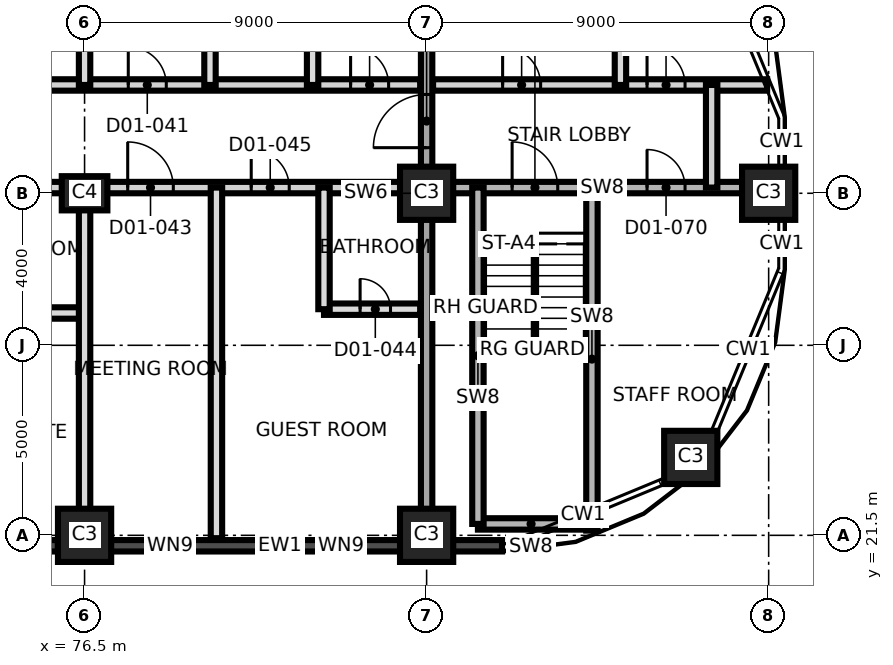
"""IFC4 building model, lengths in metres.
Left out: names, types, materials, properties, quantities, classifications, styles, units other than length and angle.
Written with IfcOpenShell. Run it as: python <this file> out.ifc"""

import sys

from ifc_helpers import new_model, si_unit, direction, frame, frame_2d, origin, origin_2d, place, context, subcontext, project, spatial, rectangle, extrude, element, fill, save


model = new_model("IFC4")
c1 = context("Model", 3, precision=1e-05, world=origin(), true_north=direction((0.0, 1.0)))
c2 = subcontext(c1, "Body", "Model", "MODEL_VIEW")
j1 = project(units=[si_unit("LENGTHUNIT", "METRE"), si_unit("PLANEANGLEUNIT", "RADIAN")], contexts=[c1])
p1 = place(None, origin())
s1 = spatial("IfcSite", under=j1, at=p1, CompositionType="ELEMENT")
p2 = place(p1, origin())
s2 = spatial("IfcBuilding", under=s1, at=p2, CompositionType="ELEMENT")
p3 = place(p2, frame((0.0, 0.0, 33.5)))
s3 = spatial("IfcBuildingStorey", under=s2, at=p3, CompositionType="ELEMENT", Elevation=33.5)
for number, where, z_axis, x_axis in (
    (1, (76.5, 21.5, 0.0), (0.0, 0.0, 1.0), (1.0, 0.0, 0.0)),
    (2, (85.5, 21.5, 0.0), (0.0, 0.0, 1.0), (1.0, 0.0, 0.0)),
    (3, (92.45, 23.55, 0.0), (0.0, 0.0, 1.0), (1.0, 0.0, 0.0)),
):
    element("IfcColumn", number, at=place(p3, frame(where, z_axis=z_axis, x_axis=x_axis)), inside=s3, PredefinedType="COLUMN", context=c2, shape_type="SweptSolid", body=[
        extrude(rectangle(XDim=1.4, YDim=1.4, at=origin_2d()), origin(), (0.0, 0.0, 1.0), 3.7),
    ])
p4 = place(p3, frame((76.5, 30.5, 0.0), z_axis=(0.0, 0.0, 1.0), x_axis=(1.0, 0.0, 0.0)))
e4 = element("IfcColumn", 4, at=p4, inside=s3, PredefinedType="COLUMN", context=c2, shape_type="SweptSolid", body=[
    extrude(rectangle(XDim=1.2, YDim=0.9, at=origin_2d()), origin(), (0.0, 0.0, 1.0), 3.7),
])
for number, where, z_axis, x_axis in (
    (5, (85.5, 30.5, 0.0), (0.0, 0.0, 1.0), (1.0, 0.0, 0.0)),
    (6, (94.5, 30.5, 0.0), (0.0, 0.0, 1.0), (1.0, 0.0, 0.0)),
):
    element("IfcColumn", number, at=place(p3, frame(where, z_axis=z_axis, x_axis=x_axis)), inside=s3, PredefinedType="COLUMN", context=c2, shape_type="SweptSolid", body=[
        extrude(rectangle(XDim=1.4, YDim=1.4, at=origin_2d()), origin(), (0.0, 0.0, 1.0), 3.7),
    ])
p5 = place(p3, frame((85.5, 21.425, 0.0), z_axis=(0.0, 0.0, 1.0), x_axis=(0.0, 1.0, 0.0)))
e7 = element("IfcWall", 7, at=p5, inside=s3, PredefinedType="SHEAR", context=c2, shape_type="SweptSolid", body=[
    extrude(rectangle(XDim=18.15, YDim=0.3, at=frame_2d((9.075, 0.0))), origin(), (0.0, 0.0, 1.0), 3.7),
])
p6 = place(p5, frame((10.275, 0.0, 0.0)))
e8 = element("IfcOpeningElement", 8, at=p6, cuts=e7, PredefinedType="OPENING", context=c2, shape_type="SweptSolid", body=[
    extrude(rectangle(XDim=1.4, YDim=2.1, at=frame_2d((0.7, 1.05))), frame((0.0, 0.16, 0.0), z_axis=(0.0, -1.0, 0.0), x_axis=(1.0, 0.0, 0.0)), (0.0, 0.0, 1.0), 0.32),
])
p7 = place(p3, frame((68.2, 21.225, 0.0), z_axis=(0.0, 0.0, 1.0), x_axis=(1.0, 0.0, 0.0)))
e9 = element("IfcWall", 9, at=p7, inside=s3, PredefinedType="SOLIDWALL", context=c2, shape_type="SweptSolid", body=[
    extrude(rectangle(XDim=7.6, YDim=0.3, at=frame_2d((3.8, 0.0))), origin(), (0.0, 0.0, 1.0), 2.7),
])
p8 = place(p7, frame((0.95, 0.0, 0.9)))
e10 = element("IfcOpeningElement", 10, at=p8, cuts=e9, PredefinedType="OPENING", context=c2, shape_type="SweptSolid", body=[
    extrude(rectangle(XDim=1.2, YDim=1.5, at=frame_2d((0.6, 0.75))), frame((0.0, 0.16, 0.0), z_axis=(0.0, -1.0, 0.0), x_axis=(1.0, 0.0, 0.0)), (0.0, 0.0, 1.0), 0.32),
])
p9 = place(p7, frame((5.45, 0.0, 0.9)))
e11 = element("IfcOpeningElement", 11, at=p9, cuts=e9, PredefinedType="OPENING", context=c2, shape_type="SweptSolid", body=[
    extrude(rectangle(XDim=1.2, YDim=1.5, at=frame_2d((0.6, 0.75))), frame((0.0, 0.16, 0.0), z_axis=(0.0, -1.0, 0.0), x_axis=(1.0, 0.0, 0.0)), (0.0, 0.0, 1.0), 0.32),
])
p10 = place(p3, frame((75.8, 21.225, 0.0), z_axis=(0.0, 0.0, 1.0), x_axis=(1.0, 0.0, 0.0)))
e12 = element("IfcWall", 12, at=p10, inside=s3, PredefinedType="SOLIDWALL", context=c2, shape_type="SweptSolid", body=[
    extrude(rectangle(XDim=11.684, YDim=0.3, at=frame_2d((5.842, 0.0))), origin(), (0.0, 0.0, 1.0), 3.4),
])
p11 = place(p10, frame((2.35, 0.0, 0.9)))
e13 = element("IfcOpeningElement", 13, at=p11, cuts=e12, PredefinedType="OPENING", context=c2, shape_type="SweptSolid", body=[
    extrude(rectangle(XDim=1.2, YDim=1.5, at=frame_2d((0.6, 0.75))), frame((0.0, 0.16, 0.0), z_axis=(0.0, -1.0, 0.0), x_axis=(1.0, 0.0, 0.0)), (0.0, 0.0, 1.0), 0.32),
])
p12 = place(p10, frame((6.85, 0.0, 0.9)))
e14 = element("IfcOpeningElement", 14, at=p12, cuts=e12, PredefinedType="OPENING", context=c2, shape_type="SweptSolid", body=[
    extrude(rectangle(XDim=1.2, YDim=1.5, at=frame_2d((0.6, 0.75))), frame((0.0, 0.16, 0.0), z_axis=(0.0, -1.0, 0.0), x_axis=(1.0, 0.0, 0.0)), (0.0, 0.0, 1.0), 0.32),
])
p13 = place(p3, frame((86.85, 21.8, 0.0), z_axis=(0.0, 0.0, 1.0), x_axis=(1.0, 0.0, 0.0)))
e15 = element("IfcWall", 15, at=p13, inside=s3, PredefinedType="SHEAR", context=c2, shape_type="SweptSolid", body=[
    extrude(rectangle(XDim=2.797, YDim=0.3, at=frame_2d((1.398, 0.0))), origin(), (0.0, 0.0, 1.0), 3.4),
])
p14 = place(p3, frame((73.5, 27.35, 0.0), z_axis=(0.0, 0.0, 1.0), x_axis=(1.0, 0.0, 0.0)))
e16 = element("IfcWall", 16, at=p14, inside=s3, PredefinedType="PARTITIONING", context=c2, shape_type="SweptSolid", body=[
    extrude(rectangle(XDim=3.0, YDim=0.3, at=frame_2d((1.5, 0.0))), origin(), (0.0, 0.0, 1.0), 3.4),
])
p15 = place(p14, frame((1.1, 0.0, 0.0)))
e17 = element("IfcOpeningElement", 17, at=p15, cuts=e16, PredefinedType="OPENING", context=c2, shape_type="SweptSolid", body=[
    extrude(rectangle(XDim=0.8, YDim=2.1, at=frame_2d((0.4, 1.05))), frame((0.0, 0.16, 0.0), z_axis=(0.0, -1.0, 0.0), x_axis=(1.0, 0.0, 0.0)), (0.0, 0.0, 1.0), 0.32),
])
p16 = place(p3, frame((82.8, 27.45, 0.0), z_axis=(0.0, 0.0, 1.0), x_axis=(1.0, 0.0, 0.0)))
e18 = element("IfcWall", 18, at=p16, inside=s3, PredefinedType="PARTITIONING", context=c2, shape_type="SweptSolid", body=[
    extrude(rectangle(XDim=2.53, YDim=0.3, at=frame_2d((1.265, 0.0))), origin(), (0.0, 0.0, 1.0), 3.4),
])
p17 = place(p16, frame((0.95, 0.0, 0.0)))
e19 = element("IfcOpeningElement", 19, at=p17, cuts=e18, PredefinedType="OPENING", context=c2, shape_type="SweptSolid", body=[
    extrude(rectangle(XDim=0.8, YDim=2.1, at=frame_2d((0.4, 1.05))), frame((0.0, 0.16, 0.0), z_axis=(0.0, -1.0, 0.0), x_axis=(1.0, 0.0, 0.0)), (0.0, 0.0, 1.0), 0.32),
])
p18 = place(p3, frame((58.95, 30.65, 0.0), z_axis=(0.0, 0.0, 1.0), x_axis=(1.0, 0.0, 0.0)))
e20 = element("IfcWall", 20, at=p18, inside=s3, PredefinedType="PARTITIONING", context=c2, shape_type="SweptSolid", body=[
    extrude(rectangle(XDim=26.38, YDim=0.3, at=frame_2d((13.19, 0.0))), origin(), (0.0, 0.0, 1.0), 3.4),
])
p19 = place(p18, frame((2.47, 0.0, 0.0)))
e21 = element("IfcOpeningElement", 21, at=p19, cuts=e20, PredefinedType="OPENING", context=c2, shape_type="SweptSolid", body=[
    extrude(rectangle(XDim=1.0, YDim=2.1, at=frame_2d((0.5, 1.05))), frame((0.0, 0.16, 0.0), z_axis=(0.0, -1.0, 0.0), x_axis=(1.0, 0.0, 0.0)), (0.0, 0.0, 1.0), 0.32),
])
p20 = place(p18, frame((4.27, 0.0, 0.0)))
e22 = element("IfcOpeningElement", 22, at=p20, cuts=e20, PredefinedType="OPENING", context=c2, shape_type="SweptSolid", body=[
    extrude(rectangle(XDim=1.0, YDim=2.1, at=frame_2d((0.5, 1.05))), frame((0.0, 0.16, 0.0), z_axis=(0.0, -1.0, 0.0), x_axis=(1.0, 0.0, 0.0)), (0.0, 0.0, 1.0), 0.32),
])
p21 = place(p18, frame((11.8, 0.0, 0.0)))
e23 = element("IfcOpeningElement", 23, at=p21, cuts=e20, PredefinedType="OPENING", context=c2, shape_type="SweptSolid", body=[
    extrude(rectangle(XDim=1.0, YDim=2.4, at=frame_2d((0.5, 1.2))), frame((0.0, 0.16, 0.0), z_axis=(0.0, -1.0, 0.0), x_axis=(1.0, 0.0, 0.0)), (0.0, 0.0, 1.0), 0.32),
])
p22 = place(p18, frame((13.3, 0.0, 0.0)))
e24 = element("IfcOpeningElement", 24, at=p22, cuts=e20, PredefinedType="OPENING", context=c2, shape_type="SweptSolid", body=[
    extrude(rectangle(XDim=1.0, YDim=2.4, at=frame_2d((0.5, 1.2))), frame((0.0, 0.16, 0.0), z_axis=(0.0, -1.0, 0.0), x_axis=(1.0, 0.0, 0.0)), (0.0, 0.0, 1.0), 0.32),
])
p23 = place(p18, frame((18.685, 0.0, 0.0)))
e25 = element("IfcOpeningElement", 25, at=p23, cuts=e20, PredefinedType="OPENING", context=c2, shape_type="SweptSolid", body=[
    extrude(rectangle(XDim=1.2, YDim=2.1, at=frame_2d((0.6, 1.05))), frame((0.0, 0.16, 0.0), z_axis=(0.0, -1.0, 0.0), x_axis=(1.0, 0.0, 0.0)), (0.0, 0.0, 1.0), 0.32),
])
p24 = place(p18, frame((21.935, 0.0, 0.0)))
e26 = element("IfcOpeningElement", 26, at=p24, cuts=e20, PredefinedType="OPENING", context=c2, shape_type="SweptSolid", body=[
    extrude(rectangle(XDim=1.0, YDim=2.1, at=frame_2d((0.5, 1.05))), frame((0.0, 0.16, 0.0), z_axis=(0.0, -1.0, 0.0), x_axis=(1.0, 0.0, 0.0)), (0.0, 0.0, 1.0), 0.32),
])
p25 = place(p3, frame((85.67, 30.65, 0.0), z_axis=(0.0, 0.0, 1.0), x_axis=(1.0, 0.0, 0.0)))
e27 = element("IfcWall", 27, at=p25, inside=s3, PredefinedType="SHEAR", context=c2, shape_type="SweptSolid", body=[
    extrude(rectangle(XDim=8.905, YDim=0.3, at=frame_2d((4.453, 0.0))), origin(), (0.0, 0.0, 1.0), 3.4),
])
p26 = place(p25, frame((2.08, 0.0, 0.0)))
e28 = element("IfcOpeningElement", 28, at=p26, cuts=e27, PredefinedType="OPENING", context=c2, shape_type="SweptSolid", body=[
    extrude(rectangle(XDim=1.2, YDim=2.1, at=frame_2d((0.6, 1.05))), frame((0.0, 0.16, 0.0), z_axis=(0.0, -1.0, 0.0), x_axis=(1.0, 0.0, 0.0)), (0.0, 0.0, 1.0), 0.32),
])
p27 = place(p25, frame((5.63, 0.0, 0.0)))
e29 = element("IfcOpeningElement", 29, at=p27, cuts=e27, PredefinedType="OPENING", context=c2, shape_type="SweptSolid", body=[
    extrude(rectangle(XDim=1.0, YDim=2.1, at=frame_2d((0.5, 1.05))), frame((0.0, 0.16, 0.0), z_axis=(0.0, -1.0, 0.0), x_axis=(1.0, 0.0, 0.0)), (0.0, 0.0, 1.0), 0.32),
])
p28 = place(p3, frame((58.95, 33.35, 0.0), z_axis=(0.0, 0.0, 1.0), x_axis=(1.0, 0.0, 0.0)))
e30 = element("IfcWall", 30, at=p28, inside=s3, PredefinedType="PARTITIONING", context=c2, shape_type="SweptSolid", body=[
    extrude(rectangle(XDim=26.38, YDim=0.3, at=frame_2d((13.19, 0.0))), origin(), (0.0, 0.0, 1.0), 3.4),
])
p29 = place(p28, frame((1.9, 0.0, 0.0)))
e31 = element("IfcOpeningElement", 31, at=p29, cuts=e30, PredefinedType="OPENING", context=c2, shape_type="SweptSolid", body=[
    extrude(rectangle(XDim=1.0, YDim=2.4, at=frame_2d((0.5, 1.2))), frame((0.0, 0.16, 0.0), z_axis=(0.0, -1.0, 0.0), x_axis=(1.0, 0.0, 0.0)), (0.0, 0.0, 1.0), 0.32),
])
p30 = place(p28, frame((9.7, 0.0, 0.0)))
e32 = element("IfcOpeningElement", 32, at=p30, cuts=e30, PredefinedType="OPENING", context=c2, shape_type="SweptSolid", body=[
    extrude(rectangle(XDim=1.0, YDim=2.1, at=frame_2d((0.5, 1.05))), frame((0.0, 0.16, 0.0), z_axis=(0.0, -1.0, 0.0), x_axis=(1.0, 0.0, 0.0)), (0.0, 0.0, 1.0), 0.32),
])
p31 = place(p28, frame((15.55, 0.0, 0.0)))
e33 = element("IfcOpeningElement", 33, at=p31, cuts=e30, PredefinedType="OPENING", context=c2, shape_type="SweptSolid", body=[
    extrude(rectangle(XDim=1.0, YDim=2.1, at=frame_2d((0.5, 1.05))), frame((0.0, 0.16, 0.0), z_axis=(0.0, -1.0, 0.0), x_axis=(1.0, 0.0, 0.0)), (0.0, 0.0, 1.0), 0.32),
])
p32 = place(p28, frame((18.7, 0.0, 0.0)))
e34 = element("IfcOpeningElement", 34, at=p32, cuts=e30, PredefinedType="OPENING", context=c2, shape_type="SweptSolid", body=[
    extrude(rectangle(XDim=1.0, YDim=2.1, at=frame_2d((0.5, 1.05))), frame((0.0, 0.16, 0.0), z_axis=(0.0, -1.0, 0.0), x_axis=(1.0, 0.0, 0.0)), (0.0, 0.0, 1.0), 0.32),
])
p33 = place(p28, frame((24.55, 0.0, 0.0)))
e35 = element("IfcOpeningElement", 35, at=p33, cuts=e30, PredefinedType="OPENING", context=c2, shape_type="SweptSolid", body=[
    extrude(rectangle(XDim=1.0, YDim=2.1, at=frame_2d((0.5, 1.05))), frame((0.0, 0.16, 0.0), z_axis=(0.0, -1.0, 0.0), x_axis=(1.0, 0.0, 0.0)), (0.0, 0.0, 1.0), 0.32),
])
p34 = place(p3, frame((85.67, 33.35, 0.0), z_axis=(0.0, 0.0, 1.0), x_axis=(1.0, 0.0, 0.0)))
e36 = element("IfcWall", 36, at=p34, inside=s3, PredefinedType="PARTITIONING", context=c2, shape_type="SweptSolid", body=[
    extrude(rectangle(XDim=8.79, YDim=0.3, at=frame_2d((4.395, 0.0))), origin(), (0.0, 0.0, 1.0), 3.4),
])
p35 = place(p34, frame((1.83, 0.0, 0.0)))
e37 = element("IfcOpeningElement", 37, at=p35, cuts=e36, PredefinedType="OPENING", context=c2, shape_type="SweptSolid", body=[
    extrude(rectangle(XDim=1.0, YDim=2.1, at=frame_2d((0.5, 1.05))), frame((0.0, 0.16, 0.0), z_axis=(0.0, -1.0, 0.0), x_axis=(1.0, 0.0, 0.0)), (0.0, 0.0, 1.0), 0.32),
])
p36 = place(p34, frame((5.63, 0.0, 0.0)))
e38 = element("IfcOpeningElement", 38, at=p36, cuts=e36, PredefinedType="OPENING", context=c2, shape_type="SweptSolid", body=[
    extrude(rectangle(XDim=1.0, YDim=2.1, at=frame_2d((0.5, 1.05))), frame((0.0, 0.16, 0.0), z_axis=(0.0, -1.0, 0.0), x_axis=(1.0, 0.0, 0.0)), (0.0, 0.0, 1.0), 0.32),
])
p37 = place(p3, frame((76.5, 21.425, 0.0), z_axis=(0.0, 0.0, 1.0), x_axis=(0.0, 1.0, 0.0)))
e39 = element("IfcWall", 39, at=p37, inside=s3, PredefinedType="PARTITIONING", context=c2, shape_type="SweptSolid", body=[
    extrude(rectangle(XDim=9.225, YDim=0.3, at=frame_2d((4.612, 0.0))), origin(), (0.0, 0.0, 1.0), 3.4),
])
p38 = place(p3, frame((76.5, 33.35, 0.0), z_axis=(0.0, 0.0, 1.0), x_axis=(0.0, 1.0, 0.0)))
e40 = element("IfcWall", 40, at=p38, inside=s3, PredefinedType="PARTITIONING", context=c2, shape_type="SweptSolid", body=[
    extrude(rectangle(XDim=6.225, YDim=0.3, at=frame_2d((3.112, 0.0))), origin(), (0.0, 0.0, 1.0), 3.4),
])
p39 = place(p3, frame((79.8, 33.35, 0.0), z_axis=(0.0, 0.0, 1.0), x_axis=(0.0, 1.0, 0.0)))
e41 = element("IfcWall", 41, at=p39, inside=s3, PredefinedType="PARTITIONING", context=c2, shape_type="SweptSolid", body=[
    extrude(rectangle(XDim=3.2, YDim=0.3, at=frame_2d((1.6, 0.0))), origin(), (0.0, 0.0, 1.0), 3.4),
])
p40 = place(p3, frame((79.97, 21.425, 0.0), z_axis=(0.0, 0.0, 1.0), x_axis=(0.0, 1.0, 0.0)))
e42 = element("IfcWall", 42, at=p40, inside=s3, PredefinedType="PARTITIONING", context=c2, shape_type="SweptSolid", body=[
    extrude(rectangle(XDim=9.225, YDim=0.3, at=frame_2d((4.612, 0.0))), origin(), (0.0, 0.0, 1.0), 3.4),
])
p41 = place(p3, frame((82.5, 33.35, 0.0), z_axis=(0.0, 0.0, 1.0), x_axis=(0.0, 1.0, 0.0)))
e43 = element("IfcWall", 43, at=p41, inside=s3, PredefinedType="PARTITIONING", context=c2, shape_type="SweptSolid", body=[
    extrude(rectangle(XDim=6.405, YDim=0.3, at=frame_2d((3.202, 0.0))), origin(), (0.0, 0.0, 1.0), 3.4),
])
p42 = place(p3, frame((82.8, 27.45, 0.0), z_axis=(0.0, 0.0, 1.0), x_axis=(0.0, 1.0, 0.0)))
e44 = element("IfcWall", 44, at=p42, inside=s3, PredefinedType="PARTITIONING", context=c2, shape_type="SweptSolid", body=[
    extrude(rectangle(XDim=3.2, YDim=0.3, at=frame_2d((1.6, 0.0))), origin(), (0.0, 0.0, 1.0), 3.4),
])
p43 = place(p3, frame((86.85, 21.8, 0.0), z_axis=(0.0, 0.0, 1.0), x_axis=(0.0, 1.0, 0.0)))
e45 = element("IfcWall", 45, at=p43, inside=s3, PredefinedType="SHEAR", context=c2, shape_type="SweptSolid", body=[
    extrude(rectangle(XDim=8.85, YDim=0.3, at=frame_2d((4.425, 0.0))), origin(), (0.0, 0.0, 1.0), 3.4),
])
p44 = place(p3, frame((89.85, 21.624, 0.0), z_axis=(0.0, 0.0, 1.0), x_axis=(0.0, 1.0, 0.0)))
e46 = element("IfcWall", 46, at=p44, inside=s3, PredefinedType="SHEAR", context=c2, shape_type="SweptSolid", body=[
    extrude(rectangle(XDim=9.026, YDim=0.3, at=frame_2d((4.513, 0.0))), origin(), (0.0, 0.0, 1.0), 3.4),
])
p45 = place(p3, frame((90.6, 33.35, 0.0), z_axis=(0.0, 0.0, 1.0), x_axis=(0.0, 1.0, 0.0)))
e47 = element("IfcWall", 47, at=p45, inside=s3, PredefinedType="PARTITIONING", context=c2, shape_type="SweptSolid", body=[
    extrude(rectangle(XDim=5.716, YDim=0.3, at=frame_2d((2.858, 0.0))), origin(), (0.0, 0.0, 1.0), 3.4),
])
p46 = place(p3, frame((93.0, 30.65, 0.0), z_axis=(0.0, 0.0, 1.0), x_axis=(0.0, 1.0, 0.0)))
e48 = element("IfcWall", 48, at=p46, inside=s3, PredefinedType="PARTITIONING", context=c2, shape_type="SweptSolid", body=[
    extrude(rectangle(XDim=2.7, YDim=0.3, at=frame_2d((1.35, 0.0))), origin(), (0.0, 0.0, 1.0), 3.4),
])
p47 = place(p11, origin())
e49 = element("IfcWindow", 49, at=p47, inside=s3, PartitioningType="SINGLE_PANEL", PredefinedType="WINDOW", context=c2, shape_type="SweptSolid", body=[
    extrude(rectangle(XDim=1.2, YDim=1.5, at=frame_2d((0.6, 0.75))), frame((0.0, 0.03, 0.0), z_axis=(0.0, -1.0, 0.0), x_axis=(1.0, 0.0, 0.0)), (0.0, 0.0, 1.0), 0.06),
])
fill(e13, e49)
p48 = place(p12, origin())
e50 = element("IfcWindow", 50, at=p48, inside=s3, PartitioningType="SINGLE_PANEL", PredefinedType="WINDOW", context=c2, shape_type="SweptSolid", body=[
    extrude(rectangle(XDim=1.2, YDim=1.5, at=frame_2d((0.6, 0.75))), frame((0.0, 0.03, 0.0), z_axis=(0.0, -1.0, 0.0), x_axis=(1.0, 0.0, 0.0)), (0.0, 0.0, 1.0), 0.06),
])
fill(e14, e50)
p49 = place(p32, origin())
e51 = element("IfcDoor", 51, at=p49, inside=s3, OperationType="SINGLE_SWING_LEFT", PredefinedType="DOOR", context=c2, shape_type="SweptSolid", body=[
    extrude(rectangle(XDim=1.0, YDim=2.1, at=frame_2d((0.5, 1.05))), frame((0.0, 0.025, 0.0), z_axis=(0.0, -1.0, 0.0), x_axis=(1.0, 0.0, 0.0)), (0.0, 0.0, 1.0), 0.05),
])
fill(e34, e51)
p50 = place(p33, origin())
e52 = element("IfcDoor", 52, at=p50, inside=s3, OperationType="SINGLE_SWING_LEFT", PredefinedType="DOOR", context=c2, shape_type="SweptSolid", body=[
    extrude(rectangle(XDim=1.0, YDim=2.1, at=frame_2d((0.5, 1.05))), frame((0.0, 0.025, 0.0), z_axis=(0.0, -1.0, 0.0), x_axis=(1.0, 0.0, 0.0)), (0.0, 0.0, 1.0), 0.05),
])
fill(e35, e52)
p51 = place(p23, origin())
e53 = element("IfcDoor", 53, at=p51, inside=s3, OperationType="SINGLE_SWING_LEFT", PredefinedType="DOOR", context=c2, shape_type="SweptSolid", body=[
    extrude(rectangle(XDim=1.2, YDim=2.1, at=frame_2d((0.6, 1.05))), frame((0.0, 0.025, 0.0), z_axis=(0.0, -1.0, 0.0), x_axis=(1.0, 0.0, 0.0)), (0.0, 0.0, 1.0), 0.05),
])
fill(e25, e53)
p52 = place(p17, origin())
e54 = element("IfcDoor", 54, at=p52, inside=s3, OperationType="SINGLE_SWING_LEFT", PredefinedType="DOOR", context=c2, shape_type="SweptSolid", body=[
    extrude(rectangle(XDim=0.8, YDim=2.1, at=frame_2d((0.4, 1.05))), frame((0.0, 0.025, 0.0), z_axis=(0.0, -1.0, 0.0), x_axis=(1.0, 0.0, 0.0)), (0.0, 0.0, 1.0), 0.05),
])
fill(e19, e54)
p53 = place(p24, origin())
e55 = element("IfcDoor", 55, at=p53, inside=s3, OperationType="SINGLE_SWING_RIGHT", PredefinedType="DOOR", context=c2, shape_type="SweptSolid", body=[
    extrude(rectangle(XDim=1.0, YDim=2.1, at=frame_2d((0.5, 1.05))), frame((0.0, 0.025, 0.0), z_axis=(0.0, -1.0, 0.0), x_axis=(1.0, 0.0, 0.0)), (0.0, 0.0, 1.0), 0.05),
])
fill(e26, e55)
p54 = place(p26, origin())
e56 = element("IfcDoor", 56, at=p54, inside=s3, OperationType="SINGLE_SWING_LEFT", PredefinedType="DOOR", context=c2, shape_type="SweptSolid", body=[
    extrude(rectangle(XDim=1.2, YDim=2.1, at=frame_2d((0.6, 1.05))), frame((0.0, 0.025, 0.0), z_axis=(0.0, -1.0, 0.0), x_axis=(1.0, 0.0, 0.0)), (0.0, 0.0, 1.0), 0.05),
])
fill(e28, e56)
p55 = place(p35, origin())
e57 = element("IfcDoor", 57, at=p55, inside=s3, OperationType="SINGLE_SWING_LEFT", PredefinedType="DOOR", context=c2, shape_type="SweptSolid", body=[
    extrude(rectangle(XDim=1.0, YDim=2.1, at=frame_2d((0.5, 1.05))), frame((0.0, 0.025, 0.0), z_axis=(0.0, -1.0, 0.0), x_axis=(1.0, 0.0, 0.0)), (0.0, 0.0, 1.0), 0.05),
])
fill(e37, e57)
p56 = place(p36, origin())
e58 = element("IfcDoor", 58, at=p56, inside=s3, OperationType="SINGLE_SWING_RIGHT", PredefinedType="DOOR", context=c2, shape_type="SweptSolid", body=[
    extrude(rectangle(XDim=1.0, YDim=2.1, at=frame_2d((0.5, 1.05))), frame((0.0, 0.025, 0.0), z_axis=(0.0, -1.0, 0.0), x_axis=(1.0, 0.0, 0.0)), (0.0, 0.0, 1.0), 0.05),
])
fill(e38, e58)
p57 = place(p27, origin())
e59 = element("IfcDoor", 59, at=p57, inside=s3, OperationType="SINGLE_SWING_LEFT", PredefinedType="DOOR", context=c2, shape_type="SweptSolid", body=[
    extrude(rectangle(XDim=1.0, YDim=2.1, at=frame_2d((0.5, 1.05))), frame((0.0, 0.025, 0.0), z_axis=(0.0, -1.0, 0.0), x_axis=(1.0, 0.0, 0.0)), (0.0, 0.0, 1.0), 0.05),
])
fill(e29, e59)
p58 = place(p6, origin())
e60 = element("IfcDoor", 60, at=p58, inside=s3, OperationType="SINGLE_SWING_RIGHT", PredefinedType="DOOR", context=c2, shape_type="SweptSolid", body=[
    extrude(rectangle(XDim=1.4, YDim=2.1, at=frame_2d((0.7, 1.05))), frame((0.0, 0.025, 0.0), z_axis=(0.0, -1.0, 0.0), x_axis=(1.0, 0.0, 0.0)), (0.0, 0.0, 1.0), 0.05),
])
fill(e8, e60)
save(model, sys.argv[1])
